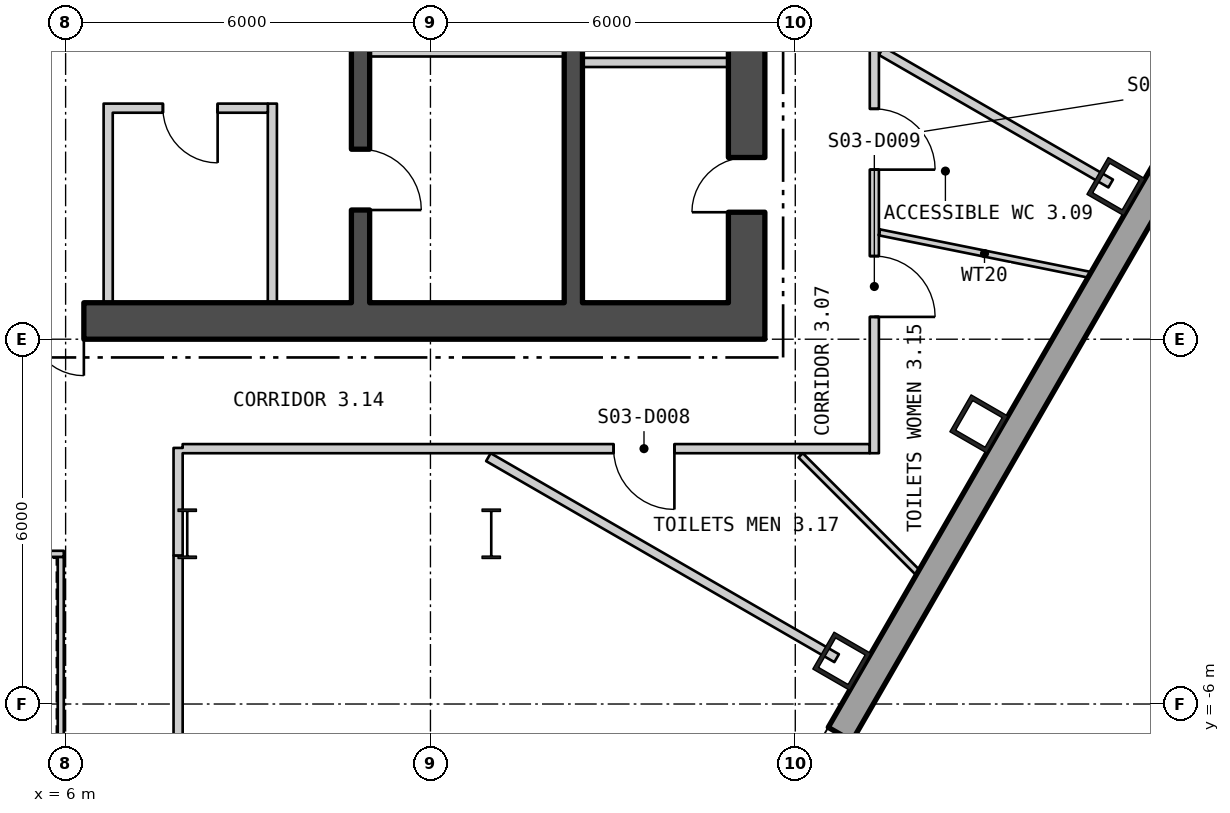
"""IFC4 building model, lengths in metres.
Left out: names, types, materials, properties, quantities, classifications, styles, units other than length and angle.
Written with IfcOpenShell. Run it as: python <this file> out.ifc"""

import sys

from ifc_helpers import new_model, si_unit, direction, frame, frame_2d, origin, origin_2d, place, context, subcontext, project, spatial, polyline, rectangle, hollow_rectangle, i_section, outline, extrude, element, fill, save


model = new_model("IFC4")
c1 = context("Model", 3, precision=1e-05, world=origin(), true_north=direction((0.0, 1.0)))
c2 = subcontext(c1, "Body", "Model", "MODEL_VIEW")
j1 = project(units=[si_unit("LENGTHUNIT", "METRE"), si_unit("PLANEANGLEUNIT", "RADIAN")], contexts=[c1])
p1 = place(None, origin())
s1 = spatial("IfcSite", under=j1, at=p1, CompositionType="ELEMENT")
p2 = place(p1, origin())
s2 = spatial("IfcBuilding", under=s1, at=p2, CompositionType="ELEMENT")
p3 = place(p2, frame((0.0, 0.0, 46.8)))
s3 = spatial("IfcBuildingStorey", under=s2, at=p3, CompositionType="ELEMENT", Elevation=46.8)
for number, where, z_axis, x_axis in (
    (1, (18.766, -5.296, 0.0), (0.0, 0.0, 1.0), (0.5, 0.866, 0.0)),
    (2, (21.02, -1.393, 0.0), (0.0, 0.0, 1.0), (0.5, 0.866, 0.0)),
    (3, (23.274, 2.511, 0.0), (0.0, 0.0, 1.0), (0.5, 0.866, 0.0)),
):
    element("IfcColumn", number, at=place(p3, frame(where, z_axis=z_axis, x_axis=x_axis)), inside=s3, PredefinedType="COLUMN", context=c2, shape_type="SweptSolid", body=[
        extrude(hollow_rectangle(XDim=0.7, YDim=0.7, WallThickness=0.07, at=origin_2d()), origin(), (0.0, 0.0, 1.0), 4.5),
    ])
for number, where, z_axis, x_axis in (
    (4, (8.0, -3.2, 0.0), (0.0, 0.0, 1.0), (1.0, 0.0, 0.0)),
    (5, (13.0, -3.2, 0.0), (0.0, 0.0, 1.0), (1.0, 0.0, 0.0)),
):
    element("IfcColumn", number, at=place(p3, frame(where, z_axis=z_axis, x_axis=x_axis)), inside=s3, PredefinedType="COLUMN", context=c2, shape_type="SweptSolid", body=[
        extrude(i_section(OverallWidth=0.303, OverallDepth=0.814, WebThickness=0.021, FlangeThickness=0.04, at=origin_2d()), origin(), (0.0, 0.0, 1.0), 4.5),
    ])
p4 = place(p3, frame((5.575, -29.294, -0.18), z_axis=(0.0, 0.0, 1.0), x_axis=(0.499999764979, 0.866025539474, 0.0)))
e6 = element("IfcWall", 6, at=p4, inside=s3, PredefinedType="SOLIDWALL", context=c2, shape_type="SweptSolid", body=[
    extrude(outline(polyline([(-0.13, -0.225), (45.87, -0.225), (45.61, 0.225), (0.13, 0.225), (-0.13, -0.225)])), origin(), (0.0, 0.0, 1.0), 4.28),
])
p5 = place(p4, frame((1.424, 0.0, 1.08)))
e7 = element("IfcOpeningElement", 7, at=p5, cuts=e6, PredefinedType="OPENING", context=c2, shape_type="SweptSolid", body=[
    extrude(rectangle(XDim=2.4, YDim=2.6, at=frame_2d((1.2, 1.3))), frame((0.0, 0.235, 0.0), z_axis=(0.0, -1.0, 0.0), x_axis=(1.0, 0.0, 0.0)), (0.0, 0.0, 1.0), 0.47),
])
p6 = place(p4, frame((5.893, 0.0, 1.08)))
e8 = element("IfcOpeningElement", 8, at=p6, cuts=e6, PredefinedType="OPENING", context=c2, shape_type="SweptSolid", body=[
    extrude(rectangle(XDim=2.4, YDim=2.6, at=frame_2d((1.2, 1.3))), frame((0.0, 0.235, 0.0), z_axis=(0.0, -1.0, 0.0), x_axis=(1.0, 0.0, 0.0)), (0.0, 0.0, 1.0), 0.47),
])
p7 = place(p4, frame((10.401, 0.0, 1.08)))
e9 = element("IfcOpeningElement", 9, at=p7, cuts=e6, PredefinedType="OPENING", context=c2, shape_type="SweptSolid", body=[
    extrude(rectangle(XDim=2.4, YDim=2.6, at=frame_2d((1.2, 1.3))), frame((0.0, 0.235, 0.0), z_axis=(0.0, -1.0, 0.0), x_axis=(1.0, 0.0, 0.0)), (0.0, 0.0, 1.0), 0.47),
])
p8 = place(p4, frame((14.909, 0.0, 1.08)))
e10 = element("IfcOpeningElement", 10, at=p8, cuts=e6, PredefinedType="OPENING", context=c2, shape_type="SweptSolid", body=[
    extrude(rectangle(XDim=2.4, YDim=2.6, at=frame_2d((1.2, 1.3))), frame((0.0, 0.235, 0.0), z_axis=(0.0, -1.0, 0.0), x_axis=(1.0, 0.0, 0.0)), (0.0, 0.0, 1.0), 0.47),
])
p9 = place(p4, frame((19.416, 0.0, 1.08)))
e11 = element("IfcOpeningElement", 11, at=p9, cuts=e6, PredefinedType="OPENING", context=c2, shape_type="SweptSolid", body=[
    extrude(rectangle(XDim=2.4, YDim=2.6, at=frame_2d((1.2, 1.3))), frame((0.0, 0.235, 0.0), z_axis=(0.0, -1.0, 0.0), x_axis=(1.0, 0.0, 0.0)), (0.0, 0.0, 1.0), 0.47),
])
p10 = place(p4, frame((23.924, 0.0, 1.08)))
e12 = element("IfcOpeningElement", 12, at=p10, cuts=e6, PredefinedType="OPENING", context=c2, shape_type="SweptSolid", body=[
    extrude(rectangle(XDim=2.4, YDim=2.6, at=frame_2d((1.2, 1.3))), frame((0.0, 0.235, 0.0), z_axis=(0.0, -1.0, 0.0), x_axis=(1.0, 0.0, 0.0)), (0.0, 0.0, 1.0), 0.47),
])
p11 = place(p4, frame((37.447, 0.0, 1.08)))
e13 = element("IfcOpeningElement", 13, at=p11, cuts=e6, PredefinedType="OPENING", context=c2, shape_type="SweptSolid", body=[
    extrude(rectangle(XDim=2.4, YDim=2.6, at=frame_2d((1.2, 1.3))), frame((0.0, 0.235, 0.0), z_axis=(0.0, -1.0, 0.0), x_axis=(1.0, 0.0, 0.0)), (0.0, 0.0, 1.0), 0.47),
])
p12 = place(p4, frame((41.916, 0.0, 1.08)))
e14 = element("IfcOpeningElement", 14, at=p12, cuts=e6, PredefinedType="OPENING", context=c2, shape_type="SweptSolid", body=[
    extrude(rectangle(XDim=2.4, YDim=2.6, at=frame_2d((1.2, 1.3))), frame((0.0, 0.235, 0.0), z_axis=(0.0, -1.0, 0.0), x_axis=(1.0, 0.0, 0.0)), (0.0, 0.0, 1.0), 0.47),
])
p13 = place(p3, frame((5.92, -11.62, 0.0), z_axis=(0.0, 0.0, 1.0), x_axis=(0.0, 1.0, 0.0)))
e15 = element("IfcWall", 15, at=p13, inside=s3, PredefinedType="PARTITIONING", context=c2, shape_type="SweptSolid", body=[
    extrude(rectangle(XDim=8.04, YDim=0.1, at=frame_2d((4.02, 0.0))), origin(), (0.0, 0.0, 1.0), 4.3),
])
p14 = place(p3, frame((5.97, -3.53, 0.0), z_axis=(0.0, 0.0, 1.0), x_axis=(-1.0, 0.0, 0.0)))
e16 = element("IfcWall", 16, at=p14, inside=s3, PredefinedType="PARTITIONING", context=c2, shape_type="SweptSolid", body=[
    extrude(rectangle(XDim=11.94, YDim=0.1, at=frame_2d((5.97, 0.0))), origin(), (0.0, 0.0, 1.0), 4.3),
])
p15 = place(p3, frame((-17.5, 0.3, 0.0), z_axis=(0.0, 0.0, 1.0), x_axis=(1.0, 0.0, 0.0)))
e17 = element("IfcWall", 17, at=p15, inside=s3, PredefinedType="SHEAR", context=c2, shape_type="SweptSolid", body=[
    extrude(rectangle(XDim=35.0, YDim=0.6, at=frame_2d((17.5, 0.0))), origin(), (0.0, 0.0, 1.0), 4.3),
])
p16 = place(p15, frame((12.0, 0.0, 0.0)))
e18 = element("IfcOpeningElement", 18, at=p16, cuts=e17, PredefinedType="OPENING", context=c2, shape_type="SweptSolid", body=[
    extrude(rectangle(XDim=1.8, YDim=2.4, at=frame_2d((0.9, 1.2))), frame((0.0, 0.31, 0.0), z_axis=(0.0, -1.0, 0.0), x_axis=(1.0, 0.0, 0.0)), (0.0, 0.0, 1.0), 0.62),
])
p17 = place(p15, frame((22.0, 0.0, 0.0)))
e19 = element("IfcOpeningElement", 19, at=p17, cuts=e17, PredefinedType="OPENING", context=c2, shape_type="SweptSolid", body=[
    extrude(rectangle(XDim=1.8, YDim=2.4, at=frame_2d((0.9, 1.2))), frame((0.0, 0.31, 0.0), z_axis=(0.0, -1.0, 0.0), x_axis=(1.0, 0.0, 0.0)), (0.0, 0.0, 1.0), 0.62),
])
p18 = place(p3, frame((17.2, 0.6, 0.0), z_axis=(0.0, 0.0, 1.0), x_axis=(0.0, 1.0, 0.0)))
e20 = element("IfcWall", 20, at=p18, inside=s3, PredefinedType="SHEAR", context=c2, shape_type="SweptSolid", body=[
    extrude(rectangle(XDim=16.8, YDim=0.6, at=frame_2d((8.4, 0.0))), origin(), (0.0, 0.0, 1.0), 4.3),
])
p19 = place(p18, frame((5.7, 0.0, 0.0)))
e21 = element("IfcOpeningElement", 21, at=p19, cuts=e20, PredefinedType="OPENING", context=c2, shape_type="SweptSolid", body=[
    extrude(rectangle(XDim=1.5, YDim=2.1, at=frame_2d((0.75, 1.05))), frame((0.0, 0.31, 0.0), z_axis=(0.0, -1.0, 0.0), x_axis=(1.0, 0.0, 0.0)), (0.0, 0.0, 1.0), 0.62),
])
p20 = place(p18, frame((1.488, 0.0, 0.0)))
e22 = element("IfcOpeningElement", 22, at=p20, cuts=e20, PredefinedType="OPENING", context=c2, shape_type="SweptSolid", body=[
    extrude(rectangle(XDim=0.9, YDim=2.1, at=frame_2d((0.45, 1.05))), frame((0.0, 0.31, 0.0), z_axis=(0.0, -1.0, 0.0), x_axis=(1.0, 0.0, 0.0)), (0.0, 0.0, 1.0), 0.62),
])
p21 = place(p18, frame((4.338, 0.0, 0.0)))
e23 = element("IfcOpeningElement", 23, at=p21, cuts=e20, PredefinedType="OPENING", context=c2, shape_type="SweptSolid", body=[
    extrude(rectangle(XDim=0.9, YDim=2.1, at=frame_2d((0.45, 1.05))), frame((0.0, 0.31, 0.0), z_axis=(0.0, -1.0, 0.0), x_axis=(1.0, 0.0, 0.0)), (0.0, 0.0, 1.0), 0.62),
])
p22 = place(p18, frame((10.483, 0.0, 0.0)))
e24 = element("IfcOpeningElement", 24, at=p22, cuts=e20, PredefinedType="OPENING", context=c2, shape_type="SweptSolid", body=[
    extrude(rectangle(XDim=0.9, YDim=2.1, at=frame_2d((0.45, 1.05))), frame((0.0, 0.31, 0.0), z_axis=(0.0, -1.0, 0.0), x_axis=(1.0, 0.0, 0.0)), (0.0, 0.0, 1.0), 0.62),
])
p23 = place(p18, frame((15.233, 0.0, 0.0)))
e25 = element("IfcOpeningElement", 25, at=p23, cuts=e20, PredefinedType="OPENING", context=c2, shape_type="SweptSolid", body=[
    extrude(rectangle(XDim=1.0, YDim=2.1, at=frame_2d((0.5, 1.05))), frame((0.0, 0.31, 0.0), z_axis=(0.0, -1.0, 0.0), x_axis=(1.0, 0.0, 0.0)), (0.0, 0.0, 1.0), 0.62),
])
p24 = place(p3, frame((10.85, 0.6, 0.0), z_axis=(0.0, 0.0, 1.0), x_axis=(0.0, 1.0, 0.0)))
e26 = element("IfcWall", 26, at=p24, inside=s3, PredefinedType="SHEAR", context=c2, shape_type="SweptSolid", body=[
    extrude(rectangle(XDim=16.8, YDim=0.3, at=frame_2d((8.4, 0.0))), origin(), (0.0, 0.0, 1.0), 4.3),
])
p25 = place(p24, frame((5.075, 0.0, 0.0)))
e27 = element("IfcOpeningElement", 27, at=p25, cuts=e26, PredefinedType="OPENING", context=c2, shape_type="SweptSolid", body=[
    extrude(rectangle(XDim=1.25, YDim=2.1, at=frame_2d((0.625, 1.05))), frame((0.0, 0.16, 0.0), z_axis=(0.0, -1.0, 0.0), x_axis=(1.0, 0.0, 0.0)), (0.0, 0.0, 1.0), 0.32),
])
p26 = place(p24, frame((1.525, 0.0, 0.0)))
e28 = element("IfcOpeningElement", 28, at=p26, cuts=e26, PredefinedType="OPENING", context=c2, shape_type="SweptSolid", body=[
    extrude(rectangle(XDim=1.0, YDim=2.1, at=frame_2d((0.5, 1.05))), frame((0.0, 0.16, 0.0), z_axis=(0.0, -1.0, 0.0), x_axis=(1.0, 0.0, 0.0)), (0.0, 0.0, 1.0), 0.32),
])
p27 = place(p3, frame((14.35, 0.6, 0.0), z_axis=(0.0, 0.0, 1.0), x_axis=(0.0, 1.0, 0.0)))
e29 = element("IfcWall", 29, at=p27, inside=s3, PredefinedType="SHEAR", context=c2, shape_type="SweptSolid", body=[
    extrude(rectangle(XDim=16.8, YDim=0.3, at=frame_2d((8.4, 0.0))), origin(), (0.0, 0.0, 1.0), 4.3),
])
p28 = place(p27, frame((5.7, 0.0, 0.0)))
e30 = element("IfcOpeningElement", 30, at=p28, cuts=e29, PredefinedType="OPENING", context=c2, shape_type="SweptSolid", body=[
    extrude(rectangle(XDim=1.5, YDim=2.1, at=frame_2d((0.75, 1.05))), frame((0.0, 0.16, 0.0), z_axis=(0.0, -1.0, 0.0), x_axis=(1.0, 0.0, 0.0)), (0.0, 0.0, 1.0), 0.32),
])
p29 = place(p3, frame((11.0, 4.725, 0.0), z_axis=(0.0, 0.0, 1.0), x_axis=(1.0, 0.0, 0.0)))
e31 = element("IfcWall", 31, at=p29, inside=s3, PredefinedType="PARTITIONING", context=c2, shape_type="SweptSolid", body=[
    extrude(rectangle(XDim=3.2, YDim=0.15, at=frame_2d((1.6, 0.0))), origin(), (0.0, 0.0, 1.0), 4.3),
])
p30 = place(p3, frame((14.5, 4.552, 0.0), z_axis=(0.0, 0.0, 1.0), x_axis=(1.0, 0.0, 0.0)))
e32 = element("IfcWall", 32, at=p30, inside=s3, PredefinedType="PARTITIONING", context=c2, shape_type="SweptSolid", body=[
    extrude(rectangle(XDim=2.4, YDim=0.15, at=frame_2d((1.2, 0.0))), origin(), (0.0, 0.0, 1.0), 4.3),
])
for number, where, z_axis, x_axis in (
    (33, (6.7, 0.6, 0.0), (0.0, 0.0, 1.0), (0.0, 1.0, 0.0)),
    (34, (9.4, 0.6, 0.0), (0.0, 0.0, 1.0), (0.0, 1.0, 0.0)),
):
    element("IfcWall", number, at=place(p3, frame(where, z_axis=z_axis, x_axis=x_axis)), inside=s3, PredefinedType="PARTITIONING", context=c2, shape_type="SweptSolid", body=[
        extrude(rectangle(XDim=3.275, YDim=0.15, at=frame_2d((1.637, 0.0))), origin(), (0.0, 0.0, 1.0), 4.3),
    ])
p31 = place(p3, frame((6.775, 3.8, 0.0), z_axis=(0.0, 0.0, 1.0), x_axis=(1.0, 0.0, 0.0)))
e35 = element("IfcWall", 35, at=p31, inside=s3, PredefinedType="PARTITIONING", context=c2, shape_type="SweptSolid", body=[
    extrude(rectangle(XDim=2.55, YDim=0.15, at=frame_2d((1.275, 0.0))), origin(), (0.0, 0.0, 1.0), 4.3),
])
p32 = place(p31, frame((0.825, 0.0, 0.0)))
e36 = element("IfcOpeningElement", 36, at=p32, cuts=e35, PredefinedType="OPENING", context=c2, shape_type="SweptSolid", body=[
    extrude(rectangle(XDim=0.9, YDim=2.1, at=frame_2d((0.45, 1.05))), frame((0.0, 0.085, 0.0), z_axis=(0.0, -1.0, 0.0), x_axis=(1.0, 0.0, 0.0)), (0.0, 0.0, 1.0), 0.17),
])
p33 = place(p3, frame((7.85, -13.675, 0.0), z_axis=(0.0, 0.0, 1.0), x_axis=(0.0, 1.0, 0.0)))
e37 = element("IfcWall", 37, at=p33, inside=s3, PredefinedType="PARTITIONING", context=c2, shape_type="SweptSolid", body=[
    extrude(rectangle(XDim=10.118, YDim=0.15, at=frame_2d((5.059, 0.0))), origin(), (0.0, 0.0, 1.0), 3.61),
])
p34 = place(p3, frame((7.85, -3.557, 0.0), z_axis=(0.0, 0.0, 1.0), x_axis=(0.0, 1.0, 0.0)))
e38 = element("IfcWall", 38, at=p34, inside=s3, PredefinedType="PARTITIONING", context=c2, shape_type="SweptSolid", body=[
    extrude(rectangle(XDim=1.769, YDim=0.15, at=frame_2d((0.884, 0.0))), origin(), (0.0, 0.0, 1.0), 4.3),
])
p35 = place(p3, frame((7.925, -1.8, 0.0), z_axis=(0.0, 0.0, 1.0), x_axis=(1.0, 0.0, 0.0)))
e39 = element("IfcWall", 39, at=p35, inside=s3, PredefinedType="PARTITIONING", context=c2, shape_type="SweptSolid", body=[
    extrude(rectangle(XDim=11.3, YDim=0.15, at=frame_2d((5.65, 0.0))), origin(), (0.0, 0.0, 1.0), 4.3),
])
p36 = place(p35, frame((7.087, 0.0, 0.0)))
e40 = element("IfcOpeningElement", 40, at=p36, cuts=e39, PredefinedType="OPENING", context=c2, shape_type="SweptSolid", body=[
    extrude(rectangle(XDim=1.0, YDim=2.1, at=frame_2d((0.5, 1.05))), frame((0.0, 0.085, 0.0), z_axis=(0.0, -1.0, 0.0), x_axis=(1.0, 0.0, 0.0)), (0.0, 0.0, 1.0), 0.17),
])
p37 = place(p3, frame((12.953, -1.94, 0.0), z_axis=(0.0, 0.0, 1.0), x_axis=(0.86605716012, -0.499944992379, 0.0)))
e41 = element("IfcWall", 41, at=p37, inside=s3, PredefinedType="PARTITIONING", context=c2, shape_type="SweptSolid", body=[
    extrude(rectangle(XDim=6.613, YDim=0.15, at=frame_2d((3.306, 0.0))), origin(), (0.0, 0.0, 1.0), 4.3),
])
p38 = place(p3, frame((18.088, -1.91, 0.0), z_axis=(0.0, 0.0, 1.0), x_axis=(0.707106781187, -0.707106781187, 0.0)))
e42 = element("IfcWall", 42, at=p38, inside=s3, PredefinedType="PARTITIONING", context=c2, shape_type="SweptSolid", body=[
    extrude(rectangle(XDim=2.722, YDim=0.1, at=frame_2d((1.361, 0.0))), origin(), (0.0, 0.0, 1.0), 4.3),
])
p39 = place(p3, frame((19.3, -1.875, 0.0), z_axis=(0.0, 0.0, 1.0), x_axis=(6.4750065e-05, 0.999999997904, 0.0)))
e43 = element("IfcWall", 43, at=p39, inside=s3, PredefinedType="PARTITIONING", context=c2, shape_type="SweptSolid", body=[
    extrude(rectangle(XDim=15.444, YDim=0.15, at=frame_2d((7.722, 0.0))), origin(), (0.0, 0.0, 1.0), 4.3),
])
p40 = place(p39, frame((2.242, 0.0, 0.0)))
e44 = element("IfcOpeningElement", 44, at=p40, cuts=e43, PredefinedType="OPENING", context=c2, shape_type="SweptSolid", body=[
    extrude(rectangle(XDim=1.0, YDim=2.1, at=frame_2d((0.5, 1.05))), frame((0.0, 0.085, 0.0), z_axis=(0.0, -1.0, 0.0), x_axis=(1.0, 0.0, 0.0)), (0.0, 0.0, 1.0), 0.17),
])
p41 = place(p39, frame((4.664, 0.0, 0.0)))
e45 = element("IfcOpeningElement", 45, at=p41, cuts=e43, PredefinedType="OPENING", context=c2, shape_type="SweptSolid", body=[
    extrude(rectangle(XDim=1.0, YDim=2.1, at=frame_2d((0.5, 1.05))), frame((0.0, 0.085, 0.0), z_axis=(0.0, -1.0, 0.0), x_axis=(1.0, 0.0, 0.0)), (0.0, 0.0, 1.0), 0.17),
])
p42 = place(p39, frame((8.732, 0.0, 0.0)))
e46 = element("IfcOpeningElement", 46, at=p42, cuts=e43, PredefinedType="OPENING", context=c2, shape_type="SweptSolid", body=[
    extrude(rectangle(XDim=1.0, YDim=2.1, at=frame_2d((0.5, 1.05))), frame((0.0, 0.085, 0.0), z_axis=(0.0, -1.0, 0.0), x_axis=(1.0, 0.0, 0.0)), (0.0, 0.0, 1.0), 0.17),
])
p43 = place(p39, frame((13.102, 0.0, 0.0)))
e47 = element("IfcOpeningElement", 47, at=p43, cuts=e43, PredefinedType="OPENING", context=c2, shape_type="SweptSolid", body=[
    extrude(rectangle(XDim=1.0, YDim=2.1, at=frame_2d((0.5, 1.05))), frame((0.0, 0.085, 0.0), z_axis=(0.0, -1.0, 0.0), x_axis=(1.0, 0.0, 0.0)), (0.0, 0.0, 1.0), 0.17),
])
p44 = place(p3, frame((19.385, 1.757, 0.0), z_axis=(0.0, 0.0, 1.0), x_axis=(0.980240840704, -0.197807720316, 0.0)))
e48 = element("IfcWall", 48, at=p44, inside=s3, PredefinedType="PARTITIONING", context=c2, shape_type="SweptSolid", body=[
    extrude(rectangle(XDim=3.524, YDim=0.1, at=frame_2d((1.762, 0.0))), origin(), (0.0, 0.0, 1.0), 4.3),
])
p45 = place(p3, frame((19.413, 4.74, 0.0), z_axis=(0.0, 0.0, 1.0), x_axis=(0.866017446268, -0.50001378257, 0.0)))
e49 = element("IfcWall", 49, at=p45, inside=s3, PredefinedType="PARTITIONING", context=c2, shape_type="SweptSolid", body=[
    extrude(rectangle(XDim=4.358, YDim=0.15, at=frame_2d((2.179, 0.0))), origin(), (0.0, 0.0, 1.0), 4.3),
])
p46 = place(p10, origin())
e50 = element("IfcWindow", 50, at=p46, inside=s3, PartitioningType="SINGLE_PANEL", PredefinedType="WINDOW", context=c2, shape_type="SweptSolid", body=[
    extrude(rectangle(XDim=2.4, YDim=2.6, at=frame_2d((1.2, 1.3))), frame((0.0, 0.105, 0.0), z_axis=(0.0, -1.0, 0.0), x_axis=(1.0, 0.0, 0.0)), (0.0, 0.0, 1.0), 0.06),
])
fill(e12, e50)
p47 = place(p26, origin())
e51 = element("IfcDoor", 51, at=p47, inside=s3, OperationType="SINGLE_SWING_LEFT", PredefinedType="DOOR", context=c2, shape_type="SweptSolid", body=[
    extrude(rectangle(XDim=1.0, YDim=2.1, at=frame_2d((0.5, 1.05))), frame((0.0, 0.025, 0.0), z_axis=(0.0, -1.0, 0.0), x_axis=(1.0, 0.0, 0.0)), (0.0, 0.0, 1.0), 0.05),
])
fill(e28, e51)
p48 = place(p20, origin())
e52 = element("IfcDoor", 52, at=p48, inside=s3, OperationType="SINGLE_SWING_RIGHT", PredefinedType="DOOR", context=c2, shape_type="SweptSolid", body=[
    extrude(rectangle(XDim=0.9, YDim=2.1, at=frame_2d((0.45, 1.05))), frame((0.0, 0.025, 0.0), z_axis=(0.0, -1.0, 0.0), x_axis=(1.0, 0.0, 0.0)), (0.0, 0.0, 1.0), 0.05),
])
fill(e22, e52)
p49 = place(p32, origin())
e53 = element("IfcDoor", 53, at=p49, inside=s3, OperationType="SINGLE_SWING_RIGHT", PredefinedType="DOOR", context=c2, shape_type="SweptSolid", body=[
    extrude(rectangle(XDim=0.9, YDim=2.1, at=frame_2d((0.45, 1.05))), frame((0.0, 0.025, 0.0), z_axis=(0.0, -1.0, 0.0), x_axis=(1.0, 0.0, 0.0)), (0.0, 0.0, 1.0), 0.05),
])
fill(e36, e53)
p50 = place(p17, origin())
e54 = element("IfcDoor", 54, at=p50, inside=s3, OperationType="DOUBLE_DOOR_SINGLE_SWING", PredefinedType="DOOR", context=c2, shape_type="SweptSolid", body=[
    extrude(rectangle(XDim=1.8, YDim=2.4, at=frame_2d((0.9, 1.2))), frame((0.0, 0.025, 0.0), z_axis=(0.0, -1.0, 0.0), x_axis=(1.0, 0.0, 0.0)), (0.0, 0.0, 1.0), 0.05),
])
fill(e19, e54)
p51 = place(p36, origin())
e55 = element("IfcDoor", 55, at=p51, inside=s3, OperationType="SINGLE_SWING_RIGHT", PredefinedType="DOOR", context=c2, shape_type="SweptSolid", body=[
    extrude(rectangle(XDim=1.0, YDim=2.1, at=frame_2d((0.5, 1.05))), frame((0.0, 0.025, 0.0), z_axis=(0.0, -1.0, 0.0), x_axis=(1.0, 0.0, 0.0)), (0.0, 0.0, 1.0), 0.05),
])
fill(e40, e55)
p52 = place(p40, origin())
e56 = element("IfcDoor", 56, at=p52, inside=s3, OperationType="SINGLE_SWING_LEFT", PredefinedType="DOOR", context=c2, shape_type="SweptSolid", body=[
    extrude(rectangle(XDim=1.0, YDim=2.1, at=frame_2d((0.5, 1.05))), frame((0.0, 0.025, 0.0), z_axis=(0.0, -1.0, 0.0), x_axis=(1.0, 0.0, 0.0)), (0.0, 0.0, 1.0), 0.05),
])
fill(e44, e56)
p53 = place(p41, origin())
e57 = element("IfcDoor", 57, at=p53, inside=s3, OperationType="SINGLE_SWING_LEFT", PredefinedType="DOOR", context=c2, shape_type="SweptSolid", body=[
    extrude(rectangle(XDim=1.0, YDim=2.1, at=frame_2d((0.5, 1.05))), frame((0.0, 0.025, 0.0), z_axis=(0.0, -1.0, 0.0), x_axis=(1.0, 0.0, 0.0)), (0.0, 0.0, 1.0), 0.05),
])
fill(e45, e57)
save(model, sys.argv[1])
